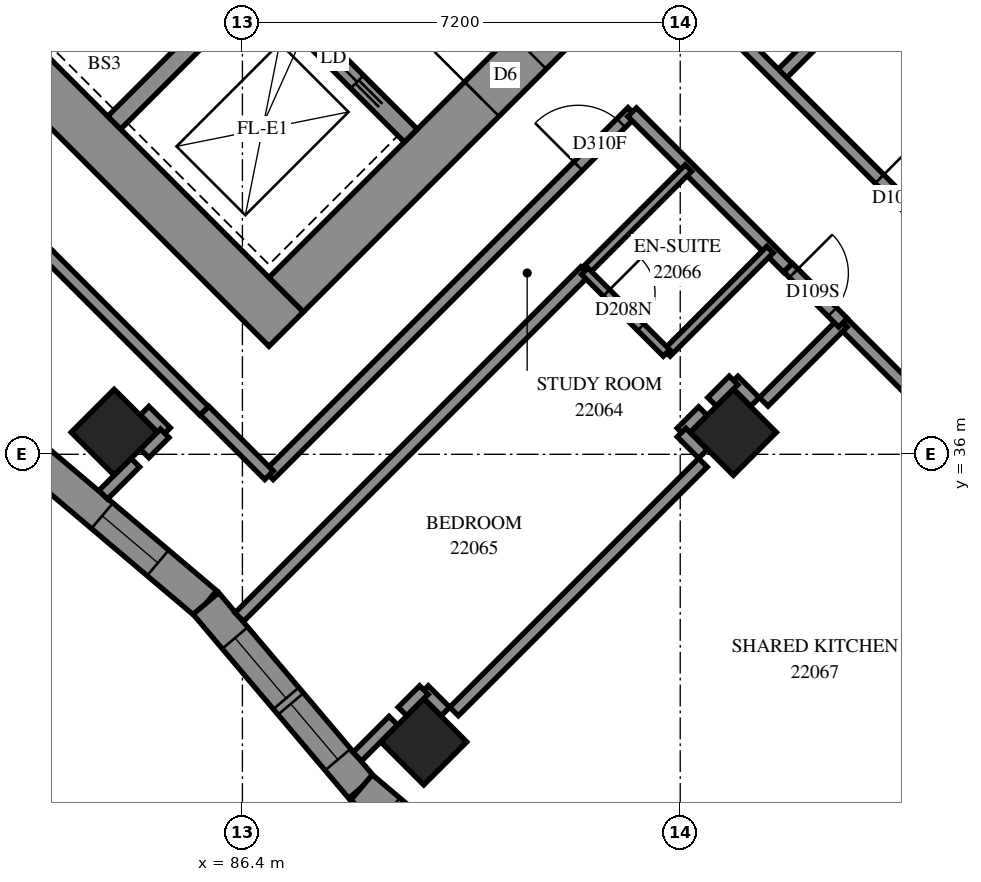
"""IFC4 building model, lengths in metres.
Left out: names, types, materials, properties, quantities, classifications, styles, units other than length and angle.
Written with IfcOpenShell. Run it as: python <this file> out.ifc"""

import sys

from ifc_helpers import new_model, si_unit, direction, frame, frame_2d, origin, origin_2d, place, context, subcontext, project, spatial, polyline, rectangle, outline, extrude, element, fill, save


model = new_model("IFC4")
c1 = context("Model", 3, precision=1e-05, world=origin(), true_north=direction((0.0, 1.0)))
c2 = subcontext(c1, "Body", "Model", "MODEL_VIEW")
j1 = project(units=[si_unit("LENGTHUNIT", "METRE"), si_unit("PLANEANGLEUNIT", "RADIAN")], contexts=[c1])
p1 = place(None, origin())
s1 = spatial("IfcSite", under=j1, at=p1, CompositionType="ELEMENT")
p2 = place(p1, origin())
s2 = spatial("IfcBuilding", under=s1, at=p2, CompositionType="ELEMENT")
p3 = place(p2, frame((0.0, 0.0, 84.6)))
s3 = spatial("IfcBuildingStorey", under=s2, at=p3, CompositionType="ELEMENT", Elevation=84.6)
for number, where, z_axis, x_axis in (
    (1, (84.291, 36.362, 0.0), (0.0, 0.0, 1.0), (0.707, -0.707, 0.0)),
    (2, (94.474, 36.362, 0.0), (0.0, 0.0, 1.0), (0.707, -0.707, 0.0)),
    (3, (89.382, 31.271, 0.0), (0.0, 0.0, 1.0), (0.707, -0.707, 0.0)),
):
    element("IfcColumn", number, at=place(p3, frame(where, z_axis=z_axis, x_axis=x_axis)), inside=s3, PredefinedType="COLUMN", context=c2, shape_type="SweptSolid", body=[
        extrude(rectangle(XDim=1.0, YDim=1.0, at=origin_2d()), origin(), (0.0, 0.0, 1.0), 3.1),
    ])
p4 = place(p3, frame((75.806, 49.373, -0.3), z_axis=(0.0, 0.0, 1.0), x_axis=(0.7071067812, -0.7071067812, 0.0)))
e4 = element("IfcWall", 4, at=p4, inside=s3, PredefinedType="SHEAR", context=c2, shape_type="SweptSolid", body=[
    extrude(rectangle(XDim=16.0, YDim=0.8, at=frame_2d((8.0, 0.0))), origin(), (0.0, 0.0, 1.0), 2.7),
])
p5 = place(p3, frame((87.12, 38.625, -0.3), z_axis=(0.0, 0.0, 1.0), x_axis=(0.7071067812, 0.7071067812, 0.0)))
e5 = element("IfcWall", 5, at=p5, inside=s3, PredefinedType="SHEAR", context=c2, shape_type="SweptSolid", body=[
    extrude(rectangle(XDim=14.4, YDim=0.8, at=frame_2d((7.2, 0.0))), origin(), (0.0, 0.0, 1.0), 2.7),
])
p6 = place(p5, frame((4.55, 0.0, 0.3)))
e6 = element("IfcOpeningElement", 6, at=p6, cuts=e5, PredefinedType="OPENING", context=c2, shape_type="SweptSolid", body=[
    extrude(rectangle(XDim=1.1, YDim=2.1, at=frame_2d((0.55, 1.05))), frame((0.0, 0.41, 0.0), z_axis=(0.0, -1.0, 0.0), x_axis=(1.0, 0.0, 0.0)), (0.0, 0.0, 1.0), 0.82),
])
p7 = place(p5, frame((11.35, 0.0, 0.3)))
e7 = element("IfcOpeningElement", 7, at=p7, cuts=e5, PredefinedType="OPENING", context=c2, shape_type="SweptSolid", body=[
    extrude(rectangle(XDim=1.1, YDim=2.1, at=frame_2d((0.55, 1.05))), frame((0.0, 0.41, 0.0), z_axis=(0.0, -1.0, 0.0), x_axis=(1.0, 0.0, 0.0)), (0.0, 0.0, 1.0), 0.82),
])
p8 = place(p3, frame((84.291, 41.453, 0.0), z_axis=(0.0, 0.0, 1.0), x_axis=(0.7071067812, 0.7071067812, 0.0)))
e8 = element("IfcWall", 8, at=p8, inside=s3, PredefinedType="SOLIDWALL", context=c2, shape_type="SweptSolid", body=[
    extrude(rectangle(XDim=3.3, YDim=0.3, at=frame_2d((1.65, 0.0))), origin(), (0.0, 0.0, 1.0), 3.1),
])
p9 = place(p3, frame((78.988, 51.423, 0.0), z_axis=(0.0, 0.0, 1.0), x_axis=(0.7071067812, -0.7071067812, 0.0)))
e9 = element("IfcWall", 9, at=p9, inside=s3, PredefinedType="SOLIDWALL", context=c2, shape_type="SweptSolid", body=[
    extrude(rectangle(XDim=14.4, YDim=0.3, at=frame_2d((7.2, 0.0))), origin(), (0.0, 0.0, 1.0), 3.1),
])
p10 = place(p9, frame((1.25, 0.0, 0.0)))
e10 = element("IfcOpeningElement", 10, at=p10, cuts=e9, PredefinedType="OPENING", context=c2, shape_type="SweptSolid", body=[
    extrude(rectangle(XDim=1.1, YDim=2.1, at=frame_2d((0.55, 1.05))), frame((0.0, 0.16, 0.0), z_axis=(0.0, -1.0, 0.0), x_axis=(1.0, 0.0, 0.0)), (0.0, 0.0, 1.0), 0.32),
])
p11 = place(p9, frame((4.85, 0.0, 0.0)))
e11 = element("IfcOpeningElement", 11, at=p11, cuts=e9, PredefinedType="OPENING", context=c2, shape_type="SweptSolid", body=[
    extrude(rectangle(XDim=1.1, YDim=2.1, at=frame_2d((0.55, 1.05))), frame((0.0, 0.16, 0.0), z_axis=(0.0, -1.0, 0.0), x_axis=(1.0, 0.0, 0.0)), (0.0, 0.0, 1.0), 0.32),
])
p12 = place(p9, frame((8.45, 0.0, 0.0)))
e12 = element("IfcOpeningElement", 12, at=p12, cuts=e9, PredefinedType="OPENING", context=c2, shape_type="SweptSolid", body=[
    extrude(rectangle(XDim=1.1, YDim=2.1, at=frame_2d((0.55, 1.05))), frame((0.0, 0.16, 0.0), z_axis=(0.0, -1.0, 0.0), x_axis=(1.0, 0.0, 0.0)), (0.0, 0.0, 1.0), 0.32),
])
p13 = place(p9, frame((12.05, 0.0, 0.0)))
e13 = element("IfcOpeningElement", 13, at=p13, cuts=e9, PredefinedType="OPENING", context=c2, shape_type="SweptSolid", body=[
    extrude(rectangle(XDim=1.1, YDim=2.1, at=frame_2d((0.55, 1.05))), frame((0.0, 0.16, 0.0), z_axis=(0.0, -1.0, 0.0), x_axis=(1.0, 0.0, 0.0)), (0.0, 0.0, 1.0), 0.32),
])
p14 = place(p3, frame((82.774, 36.105, 0.0), z_axis=(0.0, 0.0, 1.0), x_axis=(0.7635423019, -0.6457578131, 0.0)))
e14 = element("IfcWall", 14, at=p14, inside=s3, PredefinedType="SOLIDWALL", context=c2, shape_type="SweptSolid", body=[
    extrude(outline(polyline([(-0.023, -0.275), (3.939, -0.275), (3.985, 0.275), (0.023, 0.275), (-0.023, -0.275)])), origin(), (0.0, 0.0, 1.0), 3.1),
])
p15 = place(p14, frame((1.728, 0.0, 0.5)))
e15 = element("IfcOpeningElement", 15, at=p15, cuts=e14, PredefinedType="OPENING", context=c2, shape_type="SweptSolid", body=[
    extrude(rectangle(XDim=1.2, YDim=2.45, at=frame_2d((0.6, 1.225))), frame((0.0, 0.285, 0.0), z_axis=(0.0, -1.0, 0.0), x_axis=(1.0, 0.0, 0.0)), (0.0, 0.0, 1.0), 0.57),
])
p16 = place(p3, frame((85.8, 33.547, 0.0), z_axis=(0.0, 0.0, 1.0), x_axis=(0.6457578131, -0.7635423019, 0.0)))
e16 = element("IfcWall", 16, at=p16, inside=s3, PredefinedType="SOLIDWALL", context=c2, shape_type="SweptSolid", body=[
    extrude(outline(polyline([(0.023, -0.275), (3.985, -0.275), (3.939, 0.275), (-0.023, 0.275), (0.023, -0.275)])), origin(), (0.0, 0.0, 1.0), 3.1),
])
p17 = place(p16, frame((0.742, 0.0, 0.5)))
e17 = element("IfcOpeningElement", 17, at=p17, cuts=e16, PredefinedType="OPENING", context=c2, shape_type="SweptSolid", body=[
    extrude(rectangle(XDim=1.3, YDim=2.45, at=frame_2d((0.65, 1.225))), frame((0.0, 0.285, 0.0), z_axis=(0.0, -1.0, 0.0), x_axis=(1.0, 0.0, 0.0)), (0.0, 0.0, 1.0), 0.57),
])
p18 = place(p16, frame((2.162, 0.0, 0.5)))
e18 = element("IfcOpeningElement", 18, at=p18, cuts=e16, PredefinedType="OPENING", context=c2, shape_type="SweptSolid", body=[
    extrude(rectangle(XDim=1.2, YDim=2.45, at=frame_2d((0.6, 1.225))), frame((0.0, 0.285, 0.0), z_axis=(0.0, -1.0, 0.0), x_axis=(1.0, 0.0, 0.0)), (0.0, 0.0, 1.0), 0.57),
])
p19 = place(p3, frame((88.358, 30.521, 0.0), z_axis=(0.0, 0.0, 1.0), x_axis=(0.7635547458, -0.6457430993, 0.0)))
e19 = element("IfcWall", 19, at=p19, inside=s3, PredefinedType="SOLIDWALL", context=c2, shape_type="SweptSolid", body=[
    extrude(outline(polyline([(-0.023, -0.275), (3.939, -0.275), (3.985, 0.275), (0.023, 0.275), (-0.023, -0.275)])), origin(), (0.0, 0.0, 1.0), 3.1),
])
p20 = place(p19, frame((0.593, 0.0, 0.5)))
e20 = element("IfcOpeningElement", 20, at=p20, cuts=e19, PredefinedType="OPENING", context=c2, shape_type="SweptSolid", body=[
    extrude(rectangle(XDim=1.3, YDim=2.45, at=frame_2d((0.65, 1.225))), frame((0.0, 0.285, 0.0), z_axis=(0.0, -1.0, 0.0), x_axis=(1.0, 0.0, 0.0)), (0.0, 0.0, 1.0), 0.57),
])
p21 = place(p19, frame((2.093, 0.0, 0.5)))
e21 = element("IfcOpeningElement", 21, at=p21, cuts=e19, PredefinedType="OPENING", context=c2, shape_type="SweptSolid", body=[
    extrude(rectangle(XDim=1.3, YDim=2.45, at=frame_2d((0.65, 1.225))), frame((0.0, 0.285, 0.0), z_axis=(0.0, -1.0, 0.0), x_axis=(1.0, 0.0, 0.0)), (0.0, 0.0, 1.0), 0.57),
])
p22 = place(p3, frame((95.215, 42.197, 0.0), z_axis=(0.0, 0.0, 1.0), x_axis=(0.7071114753, 0.7071020871, 0.0)))
e22 = element("IfcWall", 22, at=p22, inside=s3, PredefinedType="PARTITIONING", context=c2, shape_type="SweptSolid", body=[
    extrude(rectangle(XDim=10.652, YDim=0.2, at=frame_2d((5.326, 0.0))), origin(), (0.0, 0.0, 1.0), 3.1),
])
p23 = place(p3, frame((94.294, 43.111, 0.0), z_axis=(0.0, 0.0, 1.0), x_axis=(0.7071067812, -0.7071067812, 0.0)))
e23 = element("IfcWall", 23, at=p23, inside=s3, PredefinedType="PARTITIONING", context=c2, shape_type="SweptSolid", body=[
    extrude(rectangle(XDim=8.499, YDim=0.2, at=frame_2d((4.25, 0.0))), origin(), (0.0, 0.0, 1.0), 3.1),
])
p24 = place(p23, frame((3.651, 0.0, 0.0)))
e24 = element("IfcOpeningElement", 24, at=p24, cuts=e23, PredefinedType="OPENING", context=c2, shape_type="SweptSolid", body=[
    extrude(rectangle(XDim=0.9, YDim=2.1, at=frame_2d((0.45, 1.05))), frame((0.0, 0.11, 0.0), z_axis=(0.0, -1.0, 0.0), x_axis=(1.0, 0.0, 0.0)), (0.0, 0.0, 1.0), 0.22),
])
p25 = place(p3, frame((86.835, 35.655, 0.0), z_axis=(0.0, 0.0, 1.0), x_axis=(0.7071067812, 0.7071067812, 0.0)))
e25 = element("IfcWall", 25, at=p25, inside=s3, PredefinedType="PARTITIONING", context=c2, shape_type="SweptSolid", body=[
    extrude(rectangle(XDim=8.451, YDim=0.2, at=frame_2d((4.226, 0.0))), origin(), (0.0, 0.0, 1.0), 3.1),
])
p26 = place(p25, frame((7.192, 0.0, 0.0)))
e26 = element("IfcOpeningElement", 26, at=p26, cuts=e25, PredefinedType="OPENING", context=c2, shape_type="SweptSolid", body=[
    extrude(rectangle(XDim=1.0, YDim=2.1, at=frame_2d((0.5, 1.05))), frame((0.0, 0.11, 0.0), z_axis=(0.0, -1.0, 0.0), x_axis=(1.0, 0.0, 0.0)), (0.0, 0.0, 1.0), 0.22),
])
p27 = place(p3, frame((86.349, 33.323, 0.0), z_axis=(0.0, 0.0, 1.0), x_axis=(0.7069824569, 0.7072310836, 0.0)))
e27 = element("IfcWall", 27, at=p27, inside=s3, PredefinedType="PARTITIONING", context=c2, shape_type="SweptSolid", body=[
    extrude(rectangle(XDim=8.044, YDim=0.2, at=frame_2d((4.022, 0.0))), origin(), (0.0, 0.0, 1.0), 3.1),
])
p28 = place(p3, frame((80.948, 41.536, 0.0), z_axis=(0.0, 0.0, 1.0), x_axis=(0.7071067812, -0.7071067812, 0.0)))
e28 = element("IfcWall", 28, at=p28, inside=s3, PredefinedType="PARTITIONING", context=c2, shape_type="SweptSolid", body=[
    extrude(rectangle(XDim=6.822, YDim=0.2, at=frame_2d((3.411, 0.0))), origin(), (0.0, 0.0, 1.0), 3.1),
])
p29 = place(p3, frame((89.881, 31.771, 0.0), z_axis=(0.0, 0.0, 1.0), x_axis=(0.7071067812, 0.7071067812, 0.0)))
e29 = element("IfcWall", 29, at=p29, inside=s3, PredefinedType="PARTITIONING", context=c2, shape_type="SweptSolid", body=[
    extrude(rectangle(XDim=5.787, YDim=0.2, at=frame_2d((2.893, 0.0))), origin(), (0.0, 0.0, 1.0), 3.1),
])
p30 = place(p3, frame((94.973, 26.681, 0.0), z_axis=(0.0, 0.0, 1.0), x_axis=(0.7071067812, 0.7071067812, 0.0)))
e30 = element("IfcWall", 30, at=p30, inside=s3, PredefinedType="PARTITIONING", context=c2, shape_type="SweptSolid", body=[
    extrude(rectangle(XDim=5.784, YDim=0.2, at=frame_2d((2.892, 0.0))), origin(), (0.0, 0.0, 1.0), 3.1),
])
p31 = place(p3, frame((92.809, 41.627, 0.0), z_axis=(0.0, 0.0, 1.0), x_axis=(0.7071067812, -0.7071067812, 0.0)))
e31 = element("IfcWall", 31, at=p31, inside=s3, PredefinedType="PARTITIONING", context=c2, shape_type="SweptSolid", body=[
    extrude(rectangle(XDim=3.623, YDim=0.2, at=frame_2d((1.812, 0.0))), origin(), (0.0, 0.0, 1.0), 3.1),
])
p32 = place(p3, frame((96.274, 38.162, 0.0), z_axis=(0.0, 0.0, 1.0), x_axis=(0.7071067812, -0.7071067812, 0.0)))
e32 = element("IfcWall", 32, at=p32, inside=s3, PredefinedType="PARTITIONING", context=c2, shape_type="SweptSolid", body=[
    extrude(rectangle(XDim=3.1, YDim=0.2, at=frame_2d((1.55, 0.0))), origin(), (0.0, 0.0, 1.0), 3.1),
])
for number, where, z_axis, x_axis in (
    (33, (92.037, 39.011, 0.0), (0.0, 0.0, 1.0), (0.708, 0.707, 0.0)),
    (34, (93.381, 37.667, 0.0), (0.0, 0.0, 1.0), (0.707, 0.708, 0.0)),
):
    element("IfcWall", number, at=place(p3, frame(where, z_axis=z_axis, x_axis=x_axis)), inside=s3, PredefinedType="PARTITIONING", context=c2, shape_type="SweptSolid", body=[
        extrude(rectangle(XDim=2.4, YDim=0.15, at=frame_2d((1.2, 0.0))), origin(), (0.0, 0.0, 1.0), 3.1),
    ])
p33 = place(p3, frame((92.031, 39.011, 0.0), z_axis=(0.0, 0.0, 1.0), x_axis=(0.7071067812, -0.7071067812, 0.0)))
e35 = element("IfcWall", 35, at=p33, inside=s3, PredefinedType="PARTITIONING", context=c2, shape_type="SweptSolid", body=[
    extrude(rectangle(XDim=1.901, YDim=0.15, at=frame_2d((0.95, 0.0))), origin(), (0.0, 0.0, 1.0), 3.1),
])
p34 = place(p33, frame((0.502, 0.0, 0.0)))
e36 = element("IfcOpeningElement", 36, at=p34, cuts=e35, PredefinedType="OPENING", context=c2, shape_type="SweptSolid", body=[
    extrude(rectangle(XDim=0.8, YDim=2.1, at=frame_2d((0.4, 1.05))), frame((0.0, 0.085, 0.0), z_axis=(0.0, -1.0, 0.0), x_axis=(1.0, 0.0, 0.0)), (0.0, 0.0, 1.0), 0.17),
])
p35 = place(p3, frame((94.973, 36.863, 0.0), z_axis=(0.0, 0.0, 1.0), x_axis=(0.7071067812, 0.7071067812, 0.0)))
e37 = element("IfcWall", 37, at=p35, inside=s3, PredefinedType="PARTITIONING", context=c2, shape_type="SweptSolid", body=[
    extrude(rectangle(XDim=1.841, YDim=0.2, at=frame_2d((0.921, 0.0))), origin(), (0.0, 0.0, 1.0), 3.1),
])
p36 = place(p3, frame((85.778, 36.718, 0.0), z_axis=(0.0, 0.0, 1.0), x_axis=(0.7064400143, -0.70777292, 0.0)))
e38 = element("IfcWall", 38, at=p36, inside=s3, PredefinedType="PARTITIONING", context=c2, shape_type="SweptSolid", body=[
    extrude(rectangle(XDim=1.5, YDim=0.2, at=frame_2d((0.75, 0.0))), origin(), (0.0, 0.0, 1.0), 3.1),
])
p37 = place(p3, frame((95.375, 39.069, 0.0), z_axis=(0.0, 0.0, 1.0), x_axis=(0.7063232841, -0.7078894111, 0.0)))
e39 = element("IfcWall", 39, at=p37, inside=s3, PredefinedType="PARTITIONING", context=c2, shape_type="SweptSolid", body=[
    extrude(rectangle(XDim=1.277, YDim=0.2, at=frame_2d((0.638, 0.0))), origin(), (0.0, 0.0, 1.0), 3.1),
])
p38 = place(p37, frame((0.129, 0.0, 0.0)))
e40 = element("IfcOpeningElement", 40, at=p38, cuts=e39, PredefinedType="OPENING", context=c2, shape_type="SweptSolid", body=[
    extrude(rectangle(XDim=0.9, YDim=2.1, at=frame_2d((0.45, 1.05))), frame((0.0, 0.11, 0.0), z_axis=(0.0, -1.0, 0.0), x_axis=(1.0, 0.0, 0.0)), (0.0, 0.0, 1.0), 0.22),
])
p39 = place(p3, frame((88.29, 31.028, 0.0), z_axis=(0.0, 0.0, 1.0), x_axis=(0.7071664955, 0.7070470619, 0.0)))
e41 = element("IfcWall", 41, at=p39, inside=s3, PredefinedType="PARTITIONING", context=c2, shape_type="SweptSolid", body=[
    extrude(rectangle(XDim=0.837, YDim=0.2, at=frame_2d((0.419, 0.0))), origin(), (0.0, 0.0, 1.0), 3.1),
])
p40 = place(p3, frame((84.111, 35.335, 0.0), z_axis=(0.0, 0.0, 1.0), x_axis=(0.7070398235, 0.7071737325, 0.0)))
e42 = element("IfcWall", 42, at=p40, inside=s3, PredefinedType="PARTITIONING", context=c2, shape_type="SweptSolid", body=[
    extrude(rectangle(XDim=0.747, YDim=0.2, at=frame_2d((0.373, 0.0))), origin(), (0.0, 0.0, 1.0), 3.1),
])
for number, where, z_axis, x_axis in (
    (43, (84.792, 36.718, 0.0), (0.0, 0.0, 1.0), (0.707, -0.707, 0.0)),
    (44, (93.621, 36.359, 0.0), (0.0, 0.0, 1.0), (0.707, 0.707, 0.0)),
    (45, (89.387, 32.123, 0.0), (0.0, 0.0, 1.0), (0.707, -0.707, 0.0)),
):
    element("IfcWall", number, at=place(p3, frame(where, z_axis=z_axis, x_axis=x_axis)), inside=s3, PredefinedType="PARTITIONING", context=c2, shape_type="SweptSolid", body=[
        extrude(rectangle(XDim=0.498, YDim=0.2, at=frame_2d((0.249, 0.0))), origin(), (0.0, 0.0, 1.0), 3.1),
    ])
p41 = place(p3, frame((84.791, 36.015, 0.0), z_axis=(0.0, 0.0, 1.0), x_axis=(0.7071067812, 0.7071067812, 0.0)))
e46 = element("IfcWall", 46, at=p41, inside=s3, PredefinedType="PARTITIONING", context=c2, shape_type="SweptSolid", body=[
    extrude(rectangle(XDim=0.468, YDim=0.2, at=frame_2d((0.234, 0.0))), origin(), (0.0, 0.0, 1.0), 3.1),
])
for number, where, z_axis, x_axis in (
    (47, (94.478, 37.214, 0.0), (0.0, 0.0, 1.0), (0.707, -0.707, 0.0)),
    (48, (89.033, 31.771, 0.0), (0.0, 0.0, 1.0), (0.707, 0.707, 0.0)),
    (49, (94.125, 36.863, 0.0), (0.0, 0.0, 1.0), (0.707, 0.707, 0.0)),
    (50, (93.622, 36.358, 0.0), (0.0, 0.0, 1.0), (0.707, -0.707, 0.0)),
):
    element("IfcWall", number, at=place(p3, frame(where, z_axis=z_axis, x_axis=x_axis)), inside=s3, PredefinedType="PARTITIONING", context=c2, shape_type="SweptSolid", body=[
        extrude(rectangle(XDim=0.498, YDim=0.2, at=frame_2d((0.249, 0.0))), origin(), (0.0, 0.0, 1.0), 3.1),
    ])
p42 = place(p15, origin())
e51 = element("IfcWindow", 51, at=p42, inside=s3, PartitioningType="SINGLE_PANEL", PredefinedType="WINDOW", context=c2, shape_type="SweptSolid", body=[
    extrude(rectangle(XDim=1.2, YDim=2.45, at=frame_2d((0.6, 1.225))), frame((0.0, 0.155, 0.0), z_axis=(0.0, -1.0, 0.0), x_axis=(1.0, 0.0, 0.0)), (0.0, 0.0, 1.0), 0.06),
])
fill(e15, e51)
p43 = place(p17, origin())
e52 = element("IfcWindow", 52, at=p43, inside=s3, PartitioningType="SINGLE_PANEL", PredefinedType="WINDOW", context=c2, shape_type="SweptSolid", body=[
    extrude(rectangle(XDim=1.3, YDim=2.45, at=frame_2d((0.65, 1.225))), frame((0.0, 0.155, 0.0), z_axis=(0.0, -1.0, 0.0), x_axis=(1.0, 0.0, 0.0)), (0.0, 0.0, 1.0), 0.06),
])
fill(e17, e52)
p44 = place(p6, origin())
e53 = element("IfcDoor", 53, at=p44, inside=s3, OperationType="DOUBLE_DOOR_SINGLE_SWING", PredefinedType="DOOR", context=c2, shape_type="SweptSolid", body=[
    extrude(rectangle(XDim=1.1, YDim=2.1, at=frame_2d((0.55, 1.05))), frame((0.0, 0.025, 0.0), z_axis=(0.0, -1.0, 0.0), x_axis=(1.0, 0.0, 0.0)), (0.0, 0.0, 1.0), 0.05),
])
fill(e6, e53)
p45 = place(p13, origin())
e54 = element("IfcDoor", 54, at=p45, inside=s3, OperationType="SLIDING_TO_RIGHT", PredefinedType="DOOR", context=c2, shape_type="SweptSolid", body=[
    extrude(rectangle(XDim=1.1, YDim=2.1, at=frame_2d((0.55, 1.05))), frame((0.0, 0.025, 0.0), z_axis=(0.0, -1.0, 0.0), x_axis=(1.0, 0.0, 0.0)), (0.0, 0.0, 1.0), 0.05),
])
fill(e13, e54)
p46 = place(p24, origin())
e55 = element("IfcDoor", 55, at=p46, inside=s3, OperationType="SINGLE_SWING_RIGHT", PredefinedType="DOOR", context=c2, shape_type="SweptSolid", body=[
    extrude(rectangle(XDim=0.9, YDim=2.1, at=frame_2d((0.45, 1.05))), frame((0.0, 0.025, 0.0), z_axis=(0.0, -1.0, 0.0), x_axis=(1.0, 0.0, 0.0)), (0.0, 0.0, 1.0), 0.05),
])
fill(e24, e55)
p47 = place(p26, origin())
e56 = element("IfcDoor", 56, at=p47, inside=s3, OperationType="SINGLE_SWING_RIGHT", PredefinedType="DOOR", context=c2, shape_type="SweptSolid", body=[
    extrude(rectangle(XDim=1.0, YDim=2.1, at=frame_2d((0.5, 1.05))), frame((0.0, 0.025, 0.0), z_axis=(0.0, -1.0, 0.0), x_axis=(1.0, 0.0, 0.0)), (0.0, 0.0, 1.0), 0.05),
])
fill(e26, e56)
p48 = place(p38, origin())
e57 = element("IfcDoor", 57, at=p48, inside=s3, OperationType="SINGLE_SWING_LEFT", PredefinedType="DOOR", context=c2, shape_type="SweptSolid", body=[
    extrude(rectangle(XDim=0.9, YDim=2.1, at=frame_2d((0.45, 1.05))), frame((0.0, 0.025, 0.0), z_axis=(0.0, -1.0, 0.0), x_axis=(1.0, 0.0, 0.0)), (0.0, 0.0, 1.0), 0.05),
])
fill(e40, e57)
p49 = place(p34, origin())
e58 = element("IfcDoor", 58, at=p49, inside=s3, OperationType="SINGLE_SWING_RIGHT", PredefinedType="DOOR", context=c2, shape_type="SweptSolid", body=[
    extrude(rectangle(XDim=0.8, YDim=2.1, at=frame_2d((0.4, 1.05))), frame((0.0, 0.025, 0.0), z_axis=(0.0, -1.0, 0.0), x_axis=(1.0, 0.0, 0.0)), (0.0, 0.0, 1.0), 0.05),
])
fill(e36, e58)
p50 = place(p18, origin())
e59 = element("IfcWindow", 59, at=p50, inside=s3, PartitioningType="SINGLE_PANEL", PredefinedType="WINDOW", context=c2, shape_type="SweptSolid", body=[
    extrude(rectangle(XDim=1.2, YDim=2.45, at=frame_2d((0.6, 1.225))), frame((0.0, 0.155, 0.0), z_axis=(0.0, -1.0, 0.0), x_axis=(1.0, 0.0, 0.0)), (0.0, 0.0, 1.0), 0.06),
])
fill(e18, e59)
save(model, sys.argv[1])
